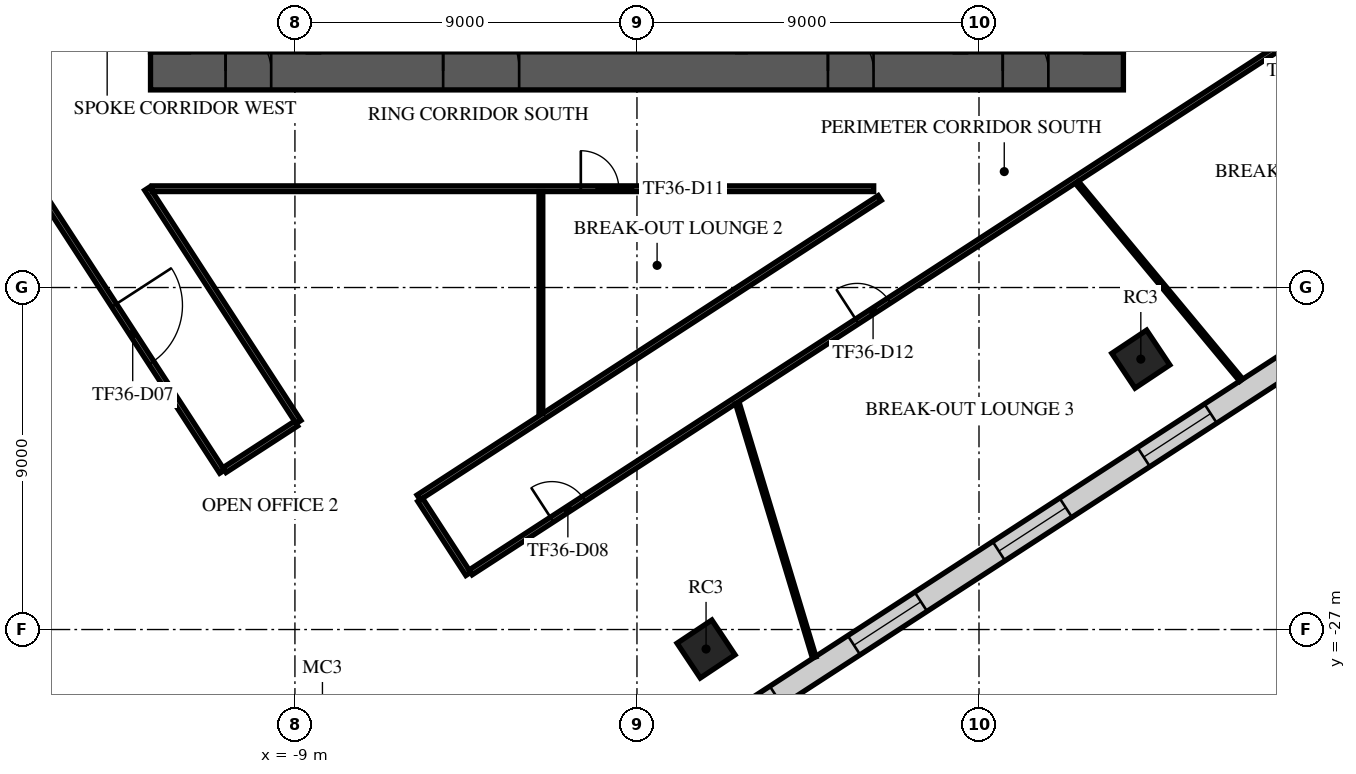
"""IFC4 building model, lengths in metres.
Left out: names, types, materials, properties, quantities, classifications, styles, units other than length and angle.
Written with IfcOpenShell. Run it as: python <this file> out.ifc"""

import sys

from ifc_helpers import new_model, si_unit, direction, frame, frame_2d, origin, origin_2d, place, context, subcontext, project, spatial, rectangle, extrude, element, fill, save


model = new_model("IFC4")
c1 = context("Model", 3, precision=1e-05, world=origin(), true_north=direction((0.0, 1.0)))
c2 = subcontext(c1, "Body", "Model", "MODEL_VIEW")
j1 = project(units=[si_unit("LENGTHUNIT", "METRE"), si_unit("PLANEANGLEUNIT", "RADIAN")], contexts=[c1])
p1 = place(None, origin())
s1 = spatial("IfcSite", under=j1, at=p1, CompositionType="ELEMENT")
p2 = place(p1, origin())
s2 = spatial("IfcBuilding", under=s1, at=p2, CompositionType="ELEMENT")
p3 = place(p2, frame((0.0, 0.0, 155.7)))
s3 = spatial("IfcBuildingStorey", under=s2, at=p3, CompositionType="ELEMENT", Elevation=155.7)
for number, where, z_axis, x_axis in (
    (1, (1.818, -27.513, 0.0), (0.0, 0.0, 1.0), (0.832, 0.555, 0.0)),
    (2, (13.258, -19.885, 0.0), (0.0, 0.0, 1.0), (0.832, 0.555, 0.0)),
):
    element("IfcColumn", number, at=place(p3, frame(where, z_axis=z_axis, x_axis=x_axis)), inside=s3, PredefinedType="COLUMN", context=c2, shape_type="SweptSolid", body=[
        extrude(rectangle(XDim=1.1, YDim=1.1, at=origin_2d()), origin(), (0.0, 0.0, 1.0), 4.0),
    ])
p4 = place(p3, frame((-12.8, -12.3, 0.0), z_axis=(0.0, 0.0, 1.0), x_axis=(1.0, 0.0, 0.0)))
e3 = element("IfcWall", 3, at=p4, inside=s3, PredefinedType="SHEAR", context=c2, shape_type="SweptSolid", body=[
    extrude(rectangle(XDim=25.6, YDim=1.0, at=frame_2d((12.8, 0.0))), origin(), (0.0, 0.0, 1.0), 3.6),
])
p5 = place(p4, frame((7.7, 0.0, 0.0)))
e4 = element("IfcOpeningElement", 4, at=p5, cuts=e3, PredefinedType="OPENING", context=c2, shape_type="SweptSolid", body=[
    extrude(rectangle(XDim=2.0, YDim=2.1, at=frame_2d((1.0, 1.05))), frame((0.0, 0.51, 0.0), z_axis=(0.0, -1.0, 0.0), x_axis=(1.0, 0.0, 0.0)), (0.0, 0.0, 1.0), 1.02),
])
p6 = place(p4, frame((17.825, 0.0, 0.0)))
e5 = element("IfcOpeningElement", 5, at=p6, cuts=e3, PredefinedType="OPENING", context=c2, shape_type="SweptSolid", body=[
    extrude(rectangle(XDim=1.2, YDim=2.1, at=frame_2d((0.6, 1.05))), frame((0.0, 0.51, 0.0), z_axis=(0.0, -1.0, 0.0), x_axis=(1.0, 0.0, 0.0)), (0.0, 0.0, 1.0), 1.02),
])
p7 = place(p4, frame((1.975, 0.0, 0.0)))
e6 = element("IfcOpeningElement", 6, at=p7, cuts=e3, PredefinedType="OPENING", context=c2, shape_type="SweptSolid", body=[
    extrude(rectangle(XDim=1.2, YDim=2.1, at=frame_2d((0.6, 1.05))), frame((0.0, 0.51, 0.0), z_axis=(0.0, -1.0, 0.0), x_axis=(1.0, 0.0, 0.0)), (0.0, 0.0, 1.0), 1.02),
])
p8 = place(p4, frame((22.425, 0.0, 0.0)))
e7 = element("IfcOpeningElement", 7, at=p8, cuts=e3, PredefinedType="OPENING", context=c2, shape_type="SweptSolid", body=[
    extrude(rectangle(XDim=1.2, YDim=2.1, at=frame_2d((0.6, 1.05))), frame((0.0, 0.51, 0.0), z_axis=(0.0, -1.0, 0.0), x_axis=(1.0, 0.0, 0.0)), (0.0, 0.0, 1.0), 1.02),
])
p9 = place(p3, frame((-36.496, 1.667, 0.0), z_axis=(0.0, 0.0, 1.0), x_axis=(0.544642236407, -0.838668488929, 0.0)))
e8 = element("IfcWall", 8, at=p9, inside=s3, PredefinedType="STANDARD", context=c2, shape_type="SweptSolid", body=[
    extrude(rectangle(XDim=42.552, YDim=0.6, at=frame_2d((21.276, 0.0))), origin(), (0.0, 0.0, 1.0), 3.6),
])
p10 = place(p9, frame((1.178, 0.0, 0.9)))
e9 = element("IfcOpeningElement", 9, at=p10, cuts=e8, PredefinedType="OPENING", context=c2, shape_type="SweptSolid", body=[
    extrude(rectangle(XDim=1.8, YDim=2.1, at=frame_2d((0.9, 1.05))), frame((0.0, 0.31, 0.0), z_axis=(0.0, -1.0, 0.0), x_axis=(1.0, 0.0, 0.0)), (0.0, 0.0, 1.0), 0.62),
])
p11 = place(p9, frame((5.396, 0.0, 0.9)))
e10 = element("IfcOpeningElement", 10, at=p11, cuts=e8, PredefinedType="OPENING", context=c2, shape_type="SweptSolid", body=[
    extrude(rectangle(XDim=1.8, YDim=2.1, at=frame_2d((0.9, 1.05))), frame((0.0, 0.31, 0.0), z_axis=(0.0, -1.0, 0.0), x_axis=(1.0, 0.0, 0.0)), (0.0, 0.0, 1.0), 0.62),
])
p12 = place(p9, frame((9.676, 0.0, 0.9)))
e11 = element("IfcOpeningElement", 11, at=p12, cuts=e8, PredefinedType="OPENING", context=c2, shape_type="SweptSolid", body=[
    extrude(rectangle(XDim=1.8, YDim=2.1, at=frame_2d((0.9, 1.05))), frame((0.0, 0.31, 0.0), z_axis=(0.0, -1.0, 0.0), x_axis=(1.0, 0.0, 0.0)), (0.0, 0.0, 1.0), 0.62),
])
p13 = place(p9, frame((13.956, 0.0, 0.9)))
e12 = element("IfcOpeningElement", 12, at=p13, cuts=e8, PredefinedType="OPENING", context=c2, shape_type="SweptSolid", body=[
    extrude(rectangle(XDim=1.8, YDim=2.1, at=frame_2d((0.9, 1.05))), frame((0.0, 0.31, 0.0), z_axis=(0.0, -1.0, 0.0), x_axis=(1.0, 0.0, 0.0)), (0.0, 0.0, 1.0), 0.62),
])
p14 = place(p9, frame((18.236, 0.0, 0.9)))
e13 = element("IfcOpeningElement", 13, at=p14, cuts=e8, PredefinedType="OPENING", context=c2, shape_type="SweptSolid", body=[
    extrude(rectangle(XDim=1.8, YDim=2.1, at=frame_2d((0.9, 1.05))), frame((0.0, 0.31, 0.0), z_axis=(0.0, -1.0, 0.0), x_axis=(1.0, 0.0, 0.0)), (0.0, 0.0, 1.0), 0.62),
])
p15 = place(p9, frame((22.516, 0.0, 0.9)))
e14 = element("IfcOpeningElement", 14, at=p15, cuts=e8, PredefinedType="OPENING", context=c2, shape_type="SweptSolid", body=[
    extrude(rectangle(XDim=1.8, YDim=2.1, at=frame_2d((0.9, 1.05))), frame((0.0, 0.31, 0.0), z_axis=(0.0, -1.0, 0.0), x_axis=(1.0, 0.0, 0.0)), (0.0, 0.0, 1.0), 0.62),
])
p16 = place(p9, frame((26.796, 0.0, 0.9)))
e15 = element("IfcOpeningElement", 15, at=p16, cuts=e8, PredefinedType="OPENING", context=c2, shape_type="SweptSolid", body=[
    extrude(rectangle(XDim=1.8, YDim=2.1, at=frame_2d((0.9, 1.05))), frame((0.0, 0.31, 0.0), z_axis=(0.0, -1.0, 0.0), x_axis=(1.0, 0.0, 0.0)), (0.0, 0.0, 1.0), 0.62),
])
p17 = place(p9, frame((31.076, 0.0, 0.9)))
e16 = element("IfcOpeningElement", 16, at=p17, cuts=e8, PredefinedType="OPENING", context=c2, shape_type="SweptSolid", body=[
    extrude(rectangle(XDim=1.8, YDim=2.1, at=frame_2d((0.9, 1.05))), frame((0.0, 0.31, 0.0), z_axis=(0.0, -1.0, 0.0), x_axis=(1.0, 0.0, 0.0)), (0.0, 0.0, 1.0), 0.62),
])
p18 = place(p9, frame((35.356, 0.0, 0.9)))
e17 = element("IfcOpeningElement", 17, at=p18, cuts=e8, PredefinedType="OPENING", context=c2, shape_type="SweptSolid", body=[
    extrude(rectangle(XDim=1.8, YDim=2.1, at=frame_2d((0.9, 1.05))), frame((0.0, 0.31, 0.0), z_axis=(0.0, -1.0, 0.0), x_axis=(1.0, 0.0, 0.0)), (0.0, 0.0, 1.0), 0.62),
])
p19 = place(p9, frame((39.573, 0.0, 0.9)))
e18 = element("IfcOpeningElement", 18, at=p19, cuts=e8, PredefinedType="OPENING", context=c2, shape_type="SweptSolid", body=[
    extrude(rectangle(XDim=1.8, YDim=2.1, at=frame_2d((0.9, 1.05))), frame((0.0, 0.31, 0.0), z_axis=(0.0, -1.0, 0.0), x_axis=(1.0, 0.0, 0.0)), (0.0, 0.0, 1.0), 0.62),
])
p20 = place(p3, frame((-6.647, -35.438, 0.0), z_axis=(0.0, 0.0, 1.0), x_axis=(0.838672034147, 0.544636777257, 0.0)))
e19 = element("IfcWall", 19, at=p20, inside=s3, PredefinedType="STANDARD", context=c2, shape_type="SweptSolid", body=[
    extrude(rectangle(XDim=49.751, YDim=0.6, at=frame_2d((24.876, 0.0))), origin(), (0.0, 0.0, 1.0), 3.6),
])
p21 = place(p20, frame((1.161, 0.0, 0.9)))
e20 = element("IfcOpeningElement", 20, at=p21, cuts=e19, PredefinedType="OPENING", context=c2, shape_type="SweptSolid", body=[
    extrude(rectangle(XDim=2.1, YDim=2.1, at=frame_2d((1.05, 1.05))), frame((0.0, 0.31, 0.0), z_axis=(0.0, -1.0, 0.0), x_axis=(1.0, 0.0, 0.0)), (0.0, 0.0, 1.0), 0.62),
])
p22 = place(p20, frame((5.644, 0.0, 0.9)))
e21 = element("IfcOpeningElement", 21, at=p22, cuts=e19, PredefinedType="OPENING", context=c2, shape_type="SweptSolid", body=[
    extrude(rectangle(XDim=2.1, YDim=2.1, at=frame_2d((1.05, 1.05))), frame((0.0, 0.31, 0.0), z_axis=(0.0, -1.0, 0.0), x_axis=(1.0, 0.0, 0.0)), (0.0, 0.0, 1.0), 0.62),
])
p23 = place(p20, frame((10.189, 0.0, 0.9)))
e22 = element("IfcOpeningElement", 22, at=p23, cuts=e19, PredefinedType="OPENING", context=c2, shape_type="SweptSolid", body=[
    extrude(rectangle(XDim=2.1, YDim=2.1, at=frame_2d((1.05, 1.05))), frame((0.0, 0.31, 0.0), z_axis=(0.0, -1.0, 0.0), x_axis=(1.0, 0.0, 0.0)), (0.0, 0.0, 1.0), 0.62),
])
p24 = place(p20, frame((14.735, 0.0, 0.9)))
e23 = element("IfcOpeningElement", 23, at=p24, cuts=e19, PredefinedType="OPENING", context=c2, shape_type="SweptSolid", body=[
    extrude(rectangle(XDim=2.1, YDim=2.1, at=frame_2d((1.05, 1.05))), frame((0.0, 0.31, 0.0), z_axis=(0.0, -1.0, 0.0), x_axis=(1.0, 0.0, 0.0)), (0.0, 0.0, 1.0), 0.62),
])
p25 = place(p20, frame((19.28, 0.0, 0.9)))
e24 = element("IfcOpeningElement", 24, at=p25, cuts=e19, PredefinedType="OPENING", context=c2, shape_type="SweptSolid", body=[
    extrude(rectangle(XDim=2.1, YDim=2.1, at=frame_2d((1.05, 1.05))), frame((0.0, 0.31, 0.0), z_axis=(0.0, -1.0, 0.0), x_axis=(1.0, 0.0, 0.0)), (0.0, 0.0, 1.0), 0.62),
])
p26 = place(p20, frame((23.826, 0.0, 0.9)))
e25 = element("IfcOpeningElement", 25, at=p26, cuts=e19, PredefinedType="OPENING", context=c2, shape_type="SweptSolid", body=[
    extrude(rectangle(XDim=2.1, YDim=2.1, at=frame_2d((1.05, 1.05))), frame((0.0, 0.31, 0.0), z_axis=(0.0, -1.0, 0.0), x_axis=(1.0, 0.0, 0.0)), (0.0, 0.0, 1.0), 0.62),
])
p27 = place(p20, frame((28.371, 0.0, 0.9)))
e26 = element("IfcOpeningElement", 26, at=p27, cuts=e19, PredefinedType="OPENING", context=c2, shape_type="SweptSolid", body=[
    extrude(rectangle(XDim=2.1, YDim=2.1, at=frame_2d((1.05, 1.05))), frame((0.0, 0.31, 0.0), z_axis=(0.0, -1.0, 0.0), x_axis=(1.0, 0.0, 0.0)), (0.0, 0.0, 1.0), 0.62),
])
p28 = place(p20, frame((32.917, 0.0, 0.9)))
e27 = element("IfcOpeningElement", 27, at=p28, cuts=e19, PredefinedType="OPENING", context=c2, shape_type="SweptSolid", body=[
    extrude(rectangle(XDim=2.1, YDim=2.1, at=frame_2d((1.05, 1.05))), frame((0.0, 0.31, 0.0), z_axis=(0.0, -1.0, 0.0), x_axis=(1.0, 0.0, 0.0)), (0.0, 0.0, 1.0), 0.62),
])
p29 = place(p20, frame((37.462, 0.0, 0.9)))
e28 = element("IfcOpeningElement", 28, at=p29, cuts=e19, PredefinedType="OPENING", context=c2, shape_type="SweptSolid", body=[
    extrude(rectangle(XDim=2.1, YDim=2.1, at=frame_2d((1.05, 1.05))), frame((0.0, 0.31, 0.0), z_axis=(0.0, -1.0, 0.0), x_axis=(1.0, 0.0, 0.0)), (0.0, 0.0, 1.0), 0.62),
])
p30 = place(p20, frame((42.008, 0.0, 0.9)))
e29 = element("IfcOpeningElement", 29, at=p30, cuts=e19, PredefinedType="OPENING", context=c2, shape_type="SweptSolid", body=[
    extrude(rectangle(XDim=2.1, YDim=2.1, at=frame_2d((1.05, 1.05))), frame((0.0, 0.31, 0.0), z_axis=(0.0, -1.0, 0.0), x_axis=(1.0, 0.0, 0.0)), (0.0, 0.0, 1.0), 0.62),
])
p31 = place(p20, frame((46.491, 0.0, 0.9)))
e30 = element("IfcOpeningElement", 30, at=p31, cuts=e19, PredefinedType="OPENING", context=c2, shape_type="SweptSolid", body=[
    extrude(rectangle(XDim=2.1, YDim=2.1, at=frame_2d((1.05, 1.05))), frame((0.0, 0.31, 0.0), z_axis=(0.0, -1.0, 0.0), x_axis=(1.0, 0.0, 0.0)), (0.0, 0.0, 1.0), 0.62),
])
p32 = place(p3, frame((-25.271, -0.744, 0.0), z_axis=(0.0, 0.0, 1.0), x_axis=(0.544659433471, -0.838657320681, 0.0)))
e31 = element("IfcWall", 31, at=p32, inside=s3, PredefinedType="PARTITIONING", context=c2, shape_type="SweptSolid", body=[
    extrude(rectangle(XDim=26.354, YDim=0.15, at=frame_2d((13.177, 0.0))), origin(), (0.0, 0.0, 1.0), 3.15),
])
p33 = place(p32, frame((13.388, 0.0, 0.0)))
e32 = element("IfcOpeningElement", 32, at=p33, cuts=e31, PredefinedType="OPENING", context=c2, shape_type="SweptSolid", body=[
    extrude(rectangle(XDim=1.0, YDim=2.1, at=frame_2d((0.5, 1.05))), frame((0.0, 0.085, 0.0), z_axis=(0.0, -1.0, 0.0), x_axis=(1.0, 0.0, 0.0)), (0.0, 0.0, 1.0), 0.17),
])
p34 = place(p32, frame((21.137, 0.0, 0.0)))
e33 = element("IfcOpeningElement", 33, at=p34, cuts=e31, PredefinedType="OPENING", context=c2, shape_type="SweptSolid", body=[
    extrude(rectangle(XDim=1.8, YDim=2.1, at=frame_2d((0.9, 1.05))), frame((0.0, 0.085, 0.0), z_axis=(0.0, -1.0, 0.0), x_axis=(1.0, 0.0, 0.0)), (0.0, 0.0, 1.0), 0.17),
])
p35 = place(p3, frame((-12.891, -15.4, 0.0), z_axis=(0.0, 0.0, 1.0), x_axis=(0.544568574612, -0.838716321258, 0.0)))
e34 = element("IfcWall", 34, at=p35, inside=s3, PredefinedType="PARTITIONING", context=c2, shape_type="SweptSolid", body=[
    extrude(rectangle(XDim=7.32, YDim=0.15, at=frame_2d((3.66, 0.0))), origin(), (0.0, 0.0, 1.0), 3.15),
])
p36 = place(p3, frame((-12.753, -15.4, 0.0), z_axis=(0.0, 0.0, 1.0), x_axis=(1.0, 0.0, 0.0)))
e35 = element("IfcWall", 35, at=p36, inside=s3, PredefinedType="PARTITIONING", context=c2, shape_type="SweptSolid", body=[
    extrude(rectangle(XDim=18.982, YDim=0.15, at=frame_2d((9.491, 0.0))), origin(), (0.0, 0.0, 1.0), 3.15),
])
p37 = place(p36, frame((11.275, 0.0, 0.0)))
e36 = element("IfcOpeningElement", 36, at=p37, cuts=e35, PredefinedType="OPENING", context=c2, shape_type="SweptSolid", body=[
    extrude(rectangle(XDim=1.0, YDim=2.1, at=frame_2d((0.5, 1.05))), frame((0.0, 0.085, 0.0), z_axis=(0.0, -1.0, 0.0), x_axis=(1.0, 0.0, 0.0)), (0.0, 0.0, 1.0), 0.17),
])
p38 = place(p3, frame((-10.854, -22.805, 0.0), z_axis=(0.0, 0.0, 1.0), x_axis=(0.838555201952, 0.544816641889, 0.0)))
e37 = element("IfcWall", 37, at=p38, inside=s3, PredefinedType="PARTITIONING", context=c2, shape_type="SweptSolid", body=[
    extrude(rectangle(XDim=2.249, YDim=0.15, at=frame_2d((1.125, 0.0))), origin(), (0.0, 0.0, 1.0), 3.6),
])
p39 = place(p3, frame((-5.746, -23.524, 0.0), z_axis=(0.0, 0.0, 1.0), x_axis=(0.838672161822, 0.544636580652, 0.0)))
e38 = element("IfcWall", 38, at=p39, inside=s3, PredefinedType="PARTITIONING", context=c2, shape_type="SweptSolid", body=[
    extrude(rectangle(XDim=14.468, YDim=0.15, at=frame_2d((7.234, 0.0))), origin(), (0.0, 0.0, 1.0), 3.15),
])
p40 = place(p3, frame((-5.705, -23.587, 0.0), z_axis=(0.0, 0.0, 1.0), x_axis=(0.544530623896, -0.838740960988, 0.0)))
e39 = element("IfcWall", 39, at=p40, inside=s3, PredefinedType="PARTITIONING", context=c2, shape_type="SweptSolid", body=[
    extrude(rectangle(XDim=2.325, YDim=0.15, at=frame_2d((1.163, 0.0))), origin(), (0.0, 0.0, 1.0), 3.6),
])
p41 = place(p3, frame((-4.376, -25.496, 0.0), z_axis=(0.0, 0.0, 1.0), x_axis=(0.838659454634, 0.544656147631, 0.0)))
e40 = element("IfcWall", 40, at=p41, inside=s3, PredefinedType="PARTITIONING", context=c2, shape_type="SweptSolid", body=[
    extrude(rectangle(XDim=35.188, YDim=0.15, at=frame_2d((17.594, 0.0))), origin(), (0.0, 0.0, 1.0), 3.15),
])
p42 = place(p41, frame((2.55, 0.0, 0.0)))
e41 = element("IfcOpeningElement", 41, at=p42, cuts=e40, PredefinedType="OPENING", context=c2, shape_type="SweptSolid", body=[
    extrude(rectangle(XDim=1.0, YDim=2.1, at=frame_2d((0.5, 1.05))), frame((0.0, 0.085, 0.0), z_axis=(0.0, -1.0, 0.0), x_axis=(1.0, 0.0, 0.0)), (0.0, 0.0, 1.0), 0.17),
])
p43 = place(p41, frame((12.126, 0.0, 0.0)))
e42 = element("IfcOpeningElement", 42, at=p43, cuts=e40, PredefinedType="OPENING", context=c2, shape_type="SweptSolid", body=[
    extrude(rectangle(XDim=1.0, YDim=2.1, at=frame_2d((0.5, 1.05))), frame((0.0, 0.085, 0.0), z_axis=(0.0, -1.0, 0.0), x_axis=(1.0, 0.0, 0.0)), (0.0, 0.0, 1.0), 0.17),
])
p44 = place(p41, frame((25.759, 0.0, 0.0)))
e43 = element("IfcOpeningElement", 43, at=p44, cuts=e40, PredefinedType="OPENING", context=c2, shape_type="SweptSolid", body=[
    extrude(rectangle(XDim=1.0, YDim=2.1, at=frame_2d((0.5, 1.05))), frame((0.0, 0.085, 0.0), z_axis=(0.0, -1.0, 0.0), x_axis=(1.0, 0.0, 0.0)), (0.0, 0.0, 1.0), 0.17),
])
p45 = place(p3, frame((-2.528, -21.312, 0.0), z_axis=(0.0, 0.0, 1.0), x_axis=(0.0, 1.0, 0.0)))
e44 = element("IfcWall", 44, at=p45, inside=s3, PredefinedType="PARTITIONING", context=c2, shape_type="SweptSolid", body=[
    extrude(rectangle(XDim=5.837, YDim=0.1, at=frame_2d((2.918, 0.0))), origin(), (0.0, 0.0, 1.0), 3.6),
])
p46 = place(p3, frame((2.643, -21.044, 0.0), z_axis=(0.0, 0.0, 1.0), x_axis=(0.289254732228, -0.957252161076, 0.0)))
e45 = element("IfcWall", 45, at=p46, inside=s3, PredefinedType="PARTITIONING", context=c2, shape_type="SweptSolid", body=[
    extrude(rectangle(XDim=6.987, YDim=0.1, at=frame_2d((3.493, 0.0))), origin(), (0.0, 0.0, 1.0), 2.9),
])
p47 = place(p3, frame((11.576, -15.233, 0.0), z_axis=(0.0, 0.0, 1.0), x_axis=(0.639033492135, -0.769178910222, 0.0)))
e46 = element("IfcWall", 46, at=p47, inside=s3, PredefinedType="PARTITIONING", context=c2, shape_type="SweptSolid", body=[
    extrude(rectangle(XDim=6.764, YDim=0.1, at=frame_2d((3.382, 0.0))), origin(), (0.0, 0.0, 1.0), 2.9),
])
p48 = place(p5, origin())
e47 = element("IfcDoor", 47, at=p48, inside=s3, OperationType="SINGLE_SWING_LEFT", PredefinedType="DOOR", context=c2, shape_type="SweptSolid", body=[
    extrude(rectangle(XDim=2.0, YDim=2.1, at=frame_2d((1.0, 1.05))), frame((0.0, 0.025, 0.0), z_axis=(0.0, -1.0, 0.0), x_axis=(1.0, 0.0, 0.0)), (0.0, 0.0, 1.0), 0.05),
])
fill(e4, e47)
p49 = place(p6, origin())
e48 = element("IfcDoor", 48, at=p49, inside=s3, OperationType="SINGLE_SWING_LEFT", PredefinedType="DOOR", context=c2, shape_type="SweptSolid", body=[
    extrude(rectangle(XDim=1.2, YDim=2.1, at=frame_2d((0.6, 1.05))), frame((0.0, 0.025, 0.0), z_axis=(0.0, -1.0, 0.0), x_axis=(1.0, 0.0, 0.0)), (0.0, 0.0, 1.0), 0.05),
])
fill(e5, e48)
p50 = place(p7, origin())
e49 = element("IfcDoor", 49, at=p50, inside=s3, OperationType="SINGLE_SWING_LEFT", PredefinedType="DOOR", context=c2, shape_type="SweptSolid", body=[
    extrude(rectangle(XDim=1.2, YDim=2.1, at=frame_2d((0.6, 1.05))), frame((0.0, 0.025, 0.0), z_axis=(0.0, -1.0, 0.0), x_axis=(1.0, 0.0, 0.0)), (0.0, 0.0, 1.0), 0.05),
])
fill(e6, e49)
p51 = place(p8, origin())
e50 = element("IfcDoor", 50, at=p51, inside=s3, OperationType="SINGLE_SWING_LEFT", PredefinedType="DOOR", context=c2, shape_type="SweptSolid", body=[
    extrude(rectangle(XDim=1.2, YDim=2.1, at=frame_2d((0.6, 1.05))), frame((0.0, 0.025, 0.0), z_axis=(0.0, -1.0, 0.0), x_axis=(1.0, 0.0, 0.0)), (0.0, 0.0, 1.0), 0.05),
])
fill(e7, e50)
p52 = place(p24, origin())
e51 = element("IfcWindow", 51, at=p52, inside=s3, PartitioningType="SINGLE_PANEL", PredefinedType="WINDOW", context=c2, shape_type="SweptSolid", body=[
    extrude(rectangle(XDim=2.1, YDim=2.1, at=frame_2d((1.05, 1.05))), frame((0.0, 0.03, 0.0), z_axis=(0.0, -1.0, 0.0), x_axis=(1.0, 0.0, 0.0)), (0.0, 0.0, 1.0), 0.06),
])
fill(e23, e51)
p53 = place(p25, origin())
e52 = element("IfcWindow", 52, at=p53, inside=s3, PartitioningType="SINGLE_PANEL", PredefinedType="WINDOW", context=c2, shape_type="SweptSolid", body=[
    extrude(rectangle(XDim=2.1, YDim=2.1, at=frame_2d((1.05, 1.05))), frame((0.0, 0.03, 0.0), z_axis=(0.0, -1.0, 0.0), x_axis=(1.0, 0.0, 0.0)), (0.0, 0.0, 1.0), 0.06),
])
fill(e24, e52)
p54 = place(p26, origin())
e53 = element("IfcWindow", 53, at=p54, inside=s3, PartitioningType="SINGLE_PANEL", PredefinedType="WINDOW", context=c2, shape_type="SweptSolid", body=[
    extrude(rectangle(XDim=2.1, YDim=2.1, at=frame_2d((1.05, 1.05))), frame((0.0, 0.03, 0.0), z_axis=(0.0, -1.0, 0.0), x_axis=(1.0, 0.0, 0.0)), (0.0, 0.0, 1.0), 0.06),
])
fill(e25, e53)
p55 = place(p34, frame((1.8, 0.0, 0.0), z_axis=(0.0, 0.0, 1.0), x_axis=(-1.0, 0.0, 0.0)))
e54 = element("IfcDoor", 54, at=p55, inside=s3, OperationType="DOUBLE_DOOR_SINGLE_SWING", PredefinedType="DOOR", context=c2, shape_type="SweptSolid", body=[
    extrude(rectangle(XDim=1.8, YDim=2.1, at=frame_2d((0.9, 1.05))), frame((0.0, 0.025, 0.0), z_axis=(0.0, -1.0, 0.0), x_axis=(1.0, 0.0, 0.0)), (0.0, 0.0, 1.0), 0.05),
])
fill(e33, e54)
p56 = place(p42, frame((1.0, 0.0, 0.0), z_axis=(0.0, 0.0, 1.0), x_axis=(-1.0, 0.0, 0.0)))
e55 = element("IfcDoor", 55, at=p56, inside=s3, OperationType="SINGLE_SWING_LEFT", PredefinedType="DOOR", context=c2, shape_type="SweptSolid", body=[
    extrude(rectangle(XDim=1.0, YDim=2.1, at=frame_2d((0.5, 1.05))), frame((0.0, 0.025, 0.0), z_axis=(0.0, -1.0, 0.0), x_axis=(1.0, 0.0, 0.0)), (0.0, 0.0, 1.0), 0.05),
])
fill(e41, e55)
p57 = place(p37, frame((1.0, 0.0, 0.0), z_axis=(0.0, 0.0, 1.0), x_axis=(-1.0, 0.0, 0.0)))
e56 = element("IfcDoor", 56, at=p57, inside=s3, OperationType="SINGLE_SWING_LEFT", PredefinedType="DOOR", context=c2, shape_type="SweptSolid", body=[
    extrude(rectangle(XDim=1.0, YDim=2.1, at=frame_2d((0.5, 1.05))), frame((0.0, 0.025, 0.0), z_axis=(0.0, -1.0, 0.0), x_axis=(1.0, 0.0, 0.0)), (0.0, 0.0, 1.0), 0.05),
])
fill(e36, e56)
p58 = place(p43, frame((1.0, 0.0, 0.0), z_axis=(0.0, 0.0, 1.0), x_axis=(-1.0, 0.0, 0.0)))
e57 = element("IfcDoor", 57, at=p58, inside=s3, OperationType="SINGLE_SWING_LEFT", PredefinedType="DOOR", context=c2, shape_type="SweptSolid", body=[
    extrude(rectangle(XDim=1.0, YDim=2.1, at=frame_2d((0.5, 1.05))), frame((0.0, 0.025, 0.0), z_axis=(0.0, -1.0, 0.0), x_axis=(1.0, 0.0, 0.0)), (0.0, 0.0, 1.0), 0.05),
])
fill(e42, e57)
save(model, sys.argv[1])
